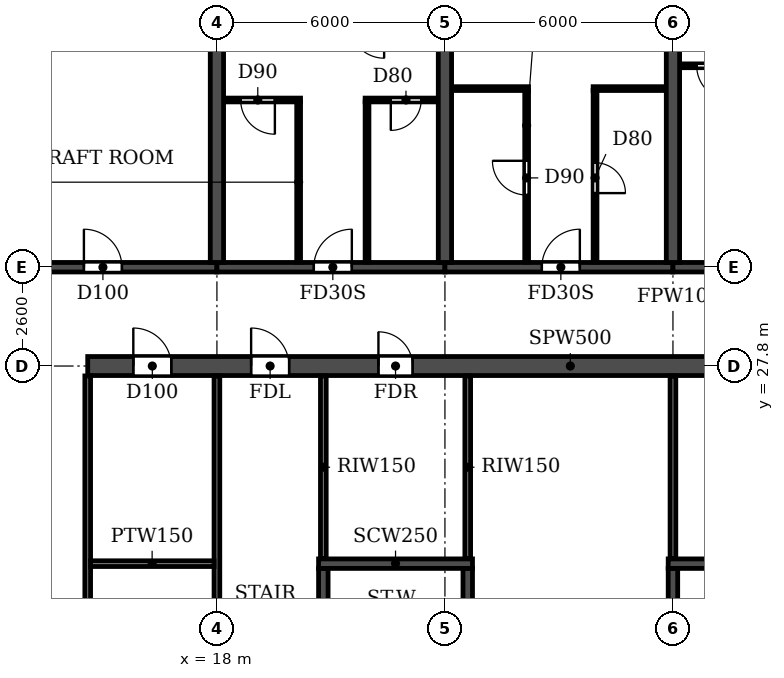
"""IFC4 building model, lengths in metres.
Left out: names, types, materials, properties, quantities, classifications, styles, units other than length and angle.
Written with IfcOpenShell. Run it as: python <this file> out.ifc"""

import sys

from ifc_helpers import new_model, si_unit, direction, frame, frame_2d, origin, place, context, subcontext, project, spatial, rectangle, extrude, element, fill, save


model = new_model("IFC4")
c1 = context("Model", 3, precision=1e-05, world=origin(), true_north=direction((0.0, 1.0)))
c2 = subcontext(c1, "Body", "Model", "MODEL_VIEW")
j1 = project(units=[si_unit("LENGTHUNIT", "METRE"), si_unit("PLANEANGLEUNIT", "RADIAN")], contexts=[c1])
p1 = place(None, origin())
s1 = spatial("IfcSite", under=j1, at=p1, CompositionType="ELEMENT")
p2 = place(p1, origin())
s2 = spatial("IfcBuilding", under=s1, at=p2, CompositionType="ELEMENT")
p3 = place(p2, frame((0.0, 0.0, 109.2)))
s3 = spatial("IfcBuildingStorey", under=s2, at=p3, CompositionType="ELEMENT", Elevation=109.2)
for number, where, z_axis, x_axis in (
    (1, (18.0, 30.525, 0.0), (0.0, 0.0, 1.0), (0.0, 1.0, 0.0)),
    (2, (24.0, 30.525, 0.0), (0.0, 0.0, 1.0), (0.0, 1.0, 0.0)),
    (3, (30.0, 30.525, 0.0), (0.0, 0.0, 1.0), (0.0, 1.0, 0.0)),
):
    element("IfcWall", number, at=place(p3, frame(where, z_axis=z_axis, x_axis=x_axis)), inside=s3, PredefinedType="SHEAR", context=c2, shape_type="SweptSolid", body=[
        extrude(rectangle(XDim=12.875, YDim=0.35, at=frame_2d((6.438, 0.0))), origin(), (0.0, 0.0, 1.0), 3.06),
    ])
p4 = place(p3, frame((12.2, 30.4, 0.0), z_axis=(0.0, 0.0, 1.0), x_axis=(1.0, 0.0, 0.0)))
e4 = element("IfcWall", 4, at=p4, inside=s3, PredefinedType="SHEAR", context=c2, shape_type="SweptSolid", body=[
    extrude(rectangle(XDim=5.8, YDim=0.25, at=frame_2d((2.9, 0.0))), origin(), (0.0, 0.0, 1.0), 2.46),
])
p5 = place(p4, frame((2.3, 0.0, 0.0)))
e5 = element("IfcOpeningElement", 5, at=p5, cuts=e4, PredefinedType="OPENING", context=c2, shape_type="SweptSolid", body=[
    extrude(rectangle(XDim=1.0, YDim=2.1, at=frame_2d((0.5, 1.05))), frame((0.0, 0.135, 0.0), z_axis=(0.0, -1.0, 0.0), x_axis=(1.0, 0.0, 0.0)), (0.0, 0.0, 1.0), 0.27),
])
p6 = place(p3, frame((18.0, 30.4, 0.0), z_axis=(0.0, 0.0, 1.0), x_axis=(1.0, 0.0, 0.0)))
e6 = element("IfcWall", 6, at=p6, inside=s3, PredefinedType="SHEAR", context=c2, shape_type="SweptSolid", body=[
    extrude(rectangle(XDim=6.0, YDim=0.25, at=frame_2d((3.0, 0.0))), origin(), (0.0, 0.0, 1.0), 2.46),
])
p7 = place(p6, frame((2.55, 0.0, 0.0)))
e7 = element("IfcOpeningElement", 7, at=p7, cuts=e6, PredefinedType="OPENING", context=c2, shape_type="SweptSolid", body=[
    extrude(rectangle(XDim=1.0, YDim=2.1, at=frame_2d((0.5, 1.05))), frame((0.0, 0.135, 0.0), z_axis=(0.0, -1.0, 0.0), x_axis=(1.0, 0.0, 0.0)), (0.0, 0.0, 1.0), 0.27),
])
p8 = place(p3, frame((24.0, 30.4, 0.0), z_axis=(0.0, 0.0, 1.0), x_axis=(1.0, 0.0, 0.0)))
e8 = element("IfcWall", 8, at=p8, inside=s3, PredefinedType="SHEAR", context=c2, shape_type="SweptSolid", body=[
    extrude(rectangle(XDim=6.0, YDim=0.25, at=frame_2d((3.0, 0.0))), origin(), (0.0, 0.0, 1.0), 2.46),
])
p9 = place(p8, frame((2.55, 0.0, 0.0)))
e9 = element("IfcOpeningElement", 9, at=p9, cuts=e8, PredefinedType="OPENING", context=c2, shape_type="SweptSolid", body=[
    extrude(rectangle(XDim=1.0, YDim=2.1, at=frame_2d((0.5, 1.05))), frame((0.0, 0.135, 0.0), z_axis=(0.0, -1.0, 0.0), x_axis=(1.0, 0.0, 0.0)), (0.0, 0.0, 1.0), 0.27),
])
p10 = place(p3, frame((30.0, 30.4, 0.0), z_axis=(0.0, 0.0, 1.0), x_axis=(1.0, 0.0, 0.0)))
e10 = element("IfcWall", 10, at=p10, inside=s3, PredefinedType="SHEAR", context=c2, shape_type="SweptSolid", body=[
    extrude(rectangle(XDim=6.0, YDim=0.25, at=frame_2d((3.0, 0.0))), origin(), (0.0, 0.0, 1.0), 2.46),
])
p11 = place(p10, frame((2.55, 0.0, 0.0)))
e11 = element("IfcOpeningElement", 11, at=p11, cuts=e10, PredefinedType="OPENING", context=c2, shape_type="SweptSolid", body=[
    extrude(rectangle(XDim=1.0, YDim=2.1, at=frame_2d((0.5, 1.05))), frame((0.0, 0.135, 0.0), z_axis=(0.0, -1.0, 0.0), x_axis=(1.0, 0.0, 0.0)), (0.0, 0.0, 1.0), 0.27),
])
p12 = place(p3, frame((14.6, 27.8, 0.0), z_axis=(0.0, 0.0, 1.0), x_axis=(1.0, 0.0, 0.0)))
e12 = element("IfcWall", 12, at=p12, inside=s3, PredefinedType="SOLIDWALL", context=c2, shape_type="SweptSolid", body=[
    extrude(rectangle(XDim=72.8, YDim=0.5, at=frame_2d((36.4, 0.0))), origin(), (0.0, 0.0, 1.0), 3.06),
])
p13 = place(p12, frame((1.2, 0.0, 0.0)))
e13 = element("IfcOpeningElement", 13, at=p13, cuts=e12, PredefinedType="OPENING", context=c2, shape_type="SweptSolid", body=[
    extrude(rectangle(XDim=1.0, YDim=2.1, at=frame_2d((0.5, 1.05))), frame((0.0, 0.26, 0.0), z_axis=(0.0, -1.0, 0.0), x_axis=(1.0, 0.0, 0.0)), (0.0, 0.0, 1.0), 0.52),
])
p14 = place(p12, frame((4.3, 0.0, 0.0)))
e14 = element("IfcOpeningElement", 14, at=p14, cuts=e12, PredefinedType="OPENING", context=c2, shape_type="SweptSolid", body=[
    extrude(rectangle(XDim=1.0, YDim=2.1, at=frame_2d((0.5, 1.05))), frame((0.0, 0.26, 0.0), z_axis=(0.0, -1.0, 0.0), x_axis=(1.0, 0.0, 0.0)), (0.0, 0.0, 1.0), 0.52),
])
p15 = place(p12, frame((7.65, 0.0, 0.0)))
e15 = element("IfcOpeningElement", 15, at=p15, cuts=e12, PredefinedType="OPENING", context=c2, shape_type="SweptSolid", body=[
    extrude(rectangle(XDim=0.9, YDim=2.1, at=frame_2d((0.45, 1.05))), frame((0.0, 0.26, 0.0), z_axis=(0.0, -1.0, 0.0), x_axis=(1.0, 0.0, 0.0)), (0.0, 0.0, 1.0), 0.52),
])
p16 = place(p12, frame((16.85, 0.0, 0.0)))
e16 = element("IfcOpeningElement", 16, at=p16, cuts=e12, PredefinedType="OPENING", context=c2, shape_type="SweptSolid", body=[
    extrude(rectangle(XDim=0.9, YDim=2.1, at=frame_2d((0.45, 1.05))), frame((0.0, 0.26, 0.0), z_axis=(0.0, -1.0, 0.0), x_axis=(1.0, 0.0, 0.0)), (0.0, 0.0, 1.0), 0.52),
])
p17 = place(p12, frame((20.0, 0.0, 0.0)))
e17 = element("IfcOpeningElement", 17, at=p17, cuts=e12, PredefinedType="OPENING", context=c2, shape_type="SweptSolid", body=[
    extrude(rectangle(XDim=1.0, YDim=2.1, at=frame_2d((0.5, 1.05))), frame((0.0, 0.26, 0.0), z_axis=(0.0, -1.0, 0.0), x_axis=(1.0, 0.0, 0.0)), (0.0, 0.0, 1.0), 0.52),
])
p18 = place(p12, frame((25.2, 0.0, 0.0)))
e18 = element("IfcOpeningElement", 18, at=p18, cuts=e12, PredefinedType="OPENING", context=c2, shape_type="SweptSolid", body=[
    extrude(rectangle(XDim=1.0, YDim=2.1, at=frame_2d((0.5, 1.05))), frame((0.0, 0.26, 0.0), z_axis=(0.0, -1.0, 0.0), x_axis=(1.0, 0.0, 0.0)), (0.0, 0.0, 1.0), 0.52),
])
p19 = place(p12, frame((33.0, 0.0, 0.0)))
e19 = element("IfcOpeningElement", 19, at=p19, cuts=e12, PredefinedType="OPENING", context=c2, shape_type="SweptSolid", body=[
    extrude(rectangle(XDim=1.0, YDim=2.1, at=frame_2d((0.5, 1.05))), frame((0.0, 0.26, 0.0), z_axis=(0.0, -1.0, 0.0), x_axis=(1.0, 0.0, 0.0)), (0.0, 0.0, 1.0), 0.52),
])
p20 = place(p12, frame((35.9, 0.0, 0.0)))
e20 = element("IfcOpeningElement", 20, at=p20, cuts=e12, PredefinedType="OPENING", context=c2, shape_type="SweptSolid", body=[
    extrude(rectangle(XDim=1.0, YDim=2.1, at=frame_2d((0.5, 1.05))), frame((0.0, 0.26, 0.0), z_axis=(0.0, -1.0, 0.0), x_axis=(1.0, 0.0, 0.0)), (0.0, 0.0, 1.0), 0.52),
])
p21 = place(p12, frame((38.8, 0.0, 0.0)))
e21 = element("IfcOpeningElement", 21, at=p21, cuts=e12, PredefinedType="OPENING", context=c2, shape_type="SweptSolid", body=[
    extrude(rectangle(XDim=1.0, YDim=2.1, at=frame_2d((0.5, 1.05))), frame((0.0, 0.26, 0.0), z_axis=(0.0, -1.0, 0.0), x_axis=(1.0, 0.0, 0.0)), (0.0, 0.0, 1.0), 0.52),
])
p22 = place(p12, frame((42.7, 0.0, 0.0)))
e22 = element("IfcOpeningElement", 22, at=p22, cuts=e12, PredefinedType="OPENING", context=c2, shape_type="SweptSolid", body=[
    extrude(rectangle(XDim=1.0, YDim=2.1, at=frame_2d((0.5, 1.05))), frame((0.0, 0.26, 0.0), z_axis=(0.0, -1.0, 0.0), x_axis=(1.0, 0.0, 0.0)), (0.0, 0.0, 1.0), 0.52),
])
p23 = place(p12, frame((47.65, 0.0, 0.0)))
e23 = element("IfcOpeningElement", 23, at=p23, cuts=e12, PredefinedType="OPENING", context=c2, shape_type="SweptSolid", body=[
    extrude(rectangle(XDim=1.5, YDim=2.1, at=frame_2d((0.75, 1.05))), frame((0.0, 0.26, 0.0), z_axis=(0.0, -1.0, 0.0), x_axis=(1.0, 0.0, 0.0)), (0.0, 0.0, 1.0), 0.52),
])
p24 = place(p12, frame((51.8, 0.0, 0.0)))
e24 = element("IfcOpeningElement", 24, at=p24, cuts=e12, PredefinedType="OPENING", context=c2, shape_type="SweptSolid", body=[
    extrude(rectangle(XDim=1.0, YDim=2.1, at=frame_2d((0.5, 1.05))), frame((0.0, 0.26, 0.0), z_axis=(0.0, -1.0, 0.0), x_axis=(1.0, 0.0, 0.0)), (0.0, 0.0, 1.0), 0.52),
])
p25 = place(p12, frame((55.05, 0.0, 0.0)))
e25 = element("IfcOpeningElement", 25, at=p25, cuts=e12, PredefinedType="OPENING", context=c2, shape_type="SweptSolid", body=[
    extrude(rectangle(XDim=0.9, YDim=2.1, at=frame_2d((0.45, 1.05))), frame((0.0, 0.26, 0.0), z_axis=(0.0, -1.0, 0.0), x_axis=(1.0, 0.0, 0.0)), (0.0, 0.0, 1.0), 0.52),
])
p26 = place(p12, frame((64.25, 0.0, 0.0)))
e26 = element("IfcOpeningElement", 26, at=p26, cuts=e12, PredefinedType="OPENING", context=c2, shape_type="SweptSolid", body=[
    extrude(rectangle(XDim=0.9, YDim=2.1, at=frame_2d((0.45, 1.05))), frame((0.0, 0.26, 0.0), z_axis=(0.0, -1.0, 0.0), x_axis=(1.0, 0.0, 0.0)), (0.0, 0.0, 1.0), 0.52),
])
p27 = place(p12, frame((67.5, 0.0, 0.0)))
e27 = element("IfcOpeningElement", 27, at=p27, cuts=e12, PredefinedType="OPENING", context=c2, shape_type="SweptSolid", body=[
    extrude(rectangle(XDim=1.0, YDim=2.1, at=frame_2d((0.5, 1.05))), frame((0.0, 0.26, 0.0), z_axis=(0.0, -1.0, 0.0), x_axis=(1.0, 0.0, 0.0)), (0.0, 0.0, 1.0), 0.52),
])
p28 = place(p12, frame((70.6, 0.0, 0.0)))
e28 = element("IfcOpeningElement", 28, at=p28, cuts=e12, PredefinedType="OPENING", context=c2, shape_type="SweptSolid", body=[
    extrude(rectangle(XDim=1.0, YDim=2.1, at=frame_2d((0.5, 1.05))), frame((0.0, 0.26, 0.0), z_axis=(0.0, -1.0, 0.0), x_axis=(1.0, 0.0, 0.0)), (0.0, 0.0, 1.0), 0.52),
])
p29 = place(p3, frame((30.0, 14.85, 0.0), z_axis=(0.0, 0.0, 1.0), x_axis=(0.0, 1.0, 0.0)))
e29 = element("IfcWall", 29, at=p29, inside=s3, PredefinedType="SOLIDWALL", context=c2, shape_type="SweptSolid", body=[
    extrude(rectangle(XDim=7.625, YDim=0.25, at=frame_2d((3.812, 0.0))), origin(), (0.0, 0.0, 1.0), 3.06),
])
p30 = place(p3, frame((29.875, 22.6, 0.0), z_axis=(0.0, 0.0, 1.0), x_axis=(1.0, 0.0, 0.0)))
e30 = element("IfcWall", 30, at=p30, inside=s3, PredefinedType="SOLIDWALL", context=c2, shape_type="SweptSolid", body=[
    extrude(rectangle(XDim=4.05, YDim=0.25, at=frame_2d((2.025, 0.0))), origin(), (0.0, 0.0, 1.0), 3.06),
])
p31 = place(p3, frame((20.8, 14.85, 0.0), z_axis=(0.0, 0.0, 1.0), x_axis=(0.0, 1.0, 0.0)))
e31 = element("IfcWall", 31, at=p31, inside=s3, PredefinedType="SOLIDWALL", context=c2, shape_type="SweptSolid", body=[
    extrude(rectangle(XDim=7.625, YDim=0.25, at=frame_2d((3.812, 0.0))), origin(), (0.0, 0.0, 1.0), 3.06),
])
p32 = place(p31, frame((0.45, 0.0, 0.0)))
e32 = element("IfcOpeningElement", 32, at=p32, cuts=e31, PredefinedType="OPENING", context=c2, shape_type="SweptSolid", body=[
    extrude(rectangle(XDim=1.0, YDim=2.1, at=frame_2d((0.5, 1.05))), frame((0.0, 0.135, 0.0), z_axis=(0.0, -1.0, 0.0), x_axis=(1.0, 0.0, 0.0)), (0.0, 0.0, 1.0), 0.27),
])
p33 = place(p3, frame((24.6, 14.85, 0.0), z_axis=(0.0, 0.0, 1.0), x_axis=(0.0, 1.0, 0.0)))
e33 = element("IfcWall", 33, at=p33, inside=s3, PredefinedType="SOLIDWALL", context=c2, shape_type="SweptSolid", body=[
    extrude(rectangle(XDim=7.625, YDim=0.25, at=frame_2d((3.812, 0.0))), origin(), (0.0, 0.0, 1.0), 3.06),
])
p34 = place(p3, frame((20.675, 22.6, 0.0), z_axis=(0.0, 0.0, 1.0), x_axis=(1.0, 0.0, 0.0)))
e34 = element("IfcWall", 34, at=p34, inside=s3, PredefinedType="SOLIDWALL", context=c2, shape_type="SweptSolid", body=[
    extrude(rectangle(XDim=4.05, YDim=0.25, at=frame_2d((2.025, 0.0))), origin(), (0.0, 0.0, 1.0), 3.06),
])
for number, where, z_axis, x_axis in (
    (35, (14.6, 14.86, 0.0), (0.0, 0.0, 1.0), (0.0, 1.0, 0.0)),
    (36, (18.0, 14.86, 0.0), (0.0, 0.0, 1.0), (0.0, 1.0, 0.0)),
):
    element("IfcWall", number, at=place(p3, frame(where, z_axis=z_axis, x_axis=x_axis)), inside=s3, PredefinedType="PARTITIONING", context=c2, shape_type="SweptSolid", body=[
        extrude(rectangle(XDim=12.68, YDim=0.15, at=frame_2d((6.34, 0.0))), origin(), (0.0, 0.0, 1.0), 3.06),
    ])
p35 = place(p3, frame((18.185, 34.8, 0.0), z_axis=(0.0, 0.0, 1.0), x_axis=(1.0, 0.0, 0.0)))
e37 = element("IfcWall", 37, at=p35, inside=s3, PredefinedType="PARTITIONING", context=c2, shape_type="SweptSolid", body=[
    extrude(rectangle(XDim=2.015, YDim=0.1, at=frame_2d((1.007, 0.0))), origin(), (0.0, 0.0, 1.0), 3.06),
])
p36 = place(p35, frame((0.44, 0.0, 0.0)))
e38 = element("IfcOpeningElement", 38, at=p36, cuts=e37, PredefinedType="OPENING", context=c2, shape_type="SweptSolid", body=[
    extrude(rectangle(XDim=0.9, YDim=2.1, at=frame_2d((0.45, 1.05))), frame((0.0, 0.06, 0.0), z_axis=(0.0, -1.0, 0.0), x_axis=(1.0, 0.0, 0.0)), (0.0, 0.0, 1.0), 0.12),
])
p37 = place(p3, frame((21.9, 34.8, 0.0), z_axis=(0.0, 0.0, 1.0), x_axis=(1.0, 0.0, 0.0)))
e39 = element("IfcWall", 39, at=p37, inside=s3, PredefinedType="PARTITIONING", context=c2, shape_type="SweptSolid", body=[
    extrude(rectangle(XDim=1.915, YDim=0.1, at=frame_2d((0.958, 0.0))), origin(), (0.0, 0.0, 1.0), 3.06),
])
p38 = place(p37, frame((0.675, 0.0, 0.0)))
e40 = element("IfcOpeningElement", 40, at=p38, cuts=e39, PredefinedType="OPENING", context=c2, shape_type="SweptSolid", body=[
    extrude(rectangle(XDim=0.8, YDim=2.1, at=frame_2d((0.4, 1.05))), frame((0.0, 0.06, 0.0), z_axis=(0.0, -1.0, 0.0), x_axis=(1.0, 0.0, 0.0)), (0.0, 0.0, 1.0), 0.12),
])
p39 = place(p3, frame((24.185, 35.1, 0.0), z_axis=(0.0, 0.0, 1.0), x_axis=(1.0, 0.0, 0.0)))
e41 = element("IfcWall", 41, at=p39, inside=s3, PredefinedType="PARTITIONING", context=c2, shape_type="SweptSolid", body=[
    extrude(rectangle(XDim=2.015, YDim=0.1, at=frame_2d((1.007, 0.0))), origin(), (0.0, 0.0, 1.0), 3.06),
])
p40 = place(p3, frame((27.9, 35.1, 0.0), z_axis=(0.0, 0.0, 1.0), x_axis=(1.0, 0.0, 0.0)))
e42 = element("IfcWall", 42, at=p40, inside=s3, PredefinedType="PARTITIONING", context=c2, shape_type="SweptSolid", body=[
    extrude(rectangle(XDim=1.915, YDim=0.1, at=frame_2d((0.958, 0.0))), origin(), (0.0, 0.0, 1.0), 3.06),
])
p41 = place(p3, frame((30.185, 35.7, 0.0), z_axis=(0.0, 0.0, 1.0), x_axis=(1.0, 0.0, 0.0)))
e43 = element("IfcWall", 43, at=p41, inside=s3, PredefinedType="PARTITIONING", context=c2, shape_type="SweptSolid", body=[
    extrude(rectangle(XDim=2.015, YDim=0.1, at=frame_2d((1.007, 0.0))), origin(), (0.0, 0.0, 1.0), 3.06),
])
p42 = place(p41, frame((0.44, 0.0, 0.0)))
e44 = element("IfcOpeningElement", 44, at=p42, cuts=e43, PredefinedType="OPENING", context=c2, shape_type="SweptSolid", body=[
    extrude(rectangle(XDim=0.9, YDim=2.1, at=frame_2d((0.45, 1.05))), frame((0.0, 0.06, 0.0), z_axis=(0.0, -1.0, 0.0), x_axis=(1.0, 0.0, 0.0)), (0.0, 0.0, 1.0), 0.12),
])
for number, where, z_axis, x_axis in (
    (45, (20.15, 30.535, 0.0), (0.0, 0.0, 1.0), (0.0, 1.0, 0.0)),
    (46, (21.95, 30.535, 0.0), (0.0, 0.0, 1.0), (0.0, 1.0, 0.0)),
):
    element("IfcWall", number, at=place(p3, frame(where, z_axis=z_axis, x_axis=x_axis)), inside=s3, PredefinedType="PARTITIONING", context=c2, shape_type="SweptSolid", body=[
        extrude(rectangle(XDim=4.215, YDim=0.1, at=frame_2d((2.107, 0.0))), origin(), (0.0, 0.0, 1.0), 3.06),
    ])
p43 = place(p3, frame((26.15, 30.535, 0.0), z_axis=(0.0, 0.0, 1.0), x_axis=(0.0, 1.0, 0.0)))
e47 = element("IfcWall", 47, at=p43, inside=s3, PredefinedType="PARTITIONING", context=c2, shape_type="SweptSolid", body=[
    extrude(rectangle(XDim=4.515, YDim=0.1, at=frame_2d((2.258, 0.0))), origin(), (0.0, 0.0, 1.0), 3.06),
])
p44 = place(p43, frame((1.765, 0.0, 0.0)))
e48 = element("IfcOpeningElement", 48, at=p44, cuts=e47, PredefinedType="OPENING", context=c2, shape_type="SweptSolid", body=[
    extrude(rectangle(XDim=0.9, YDim=2.1, at=frame_2d((0.45, 1.05))), frame((0.0, 0.06, 0.0), z_axis=(0.0, -1.0, 0.0), x_axis=(1.0, 0.0, 0.0)), (0.0, 0.0, 1.0), 0.12),
])
p45 = place(p3, frame((27.95, 30.535, 0.0), z_axis=(0.0, 0.0, 1.0), x_axis=(0.0, 1.0, 0.0)))
e49 = element("IfcWall", 49, at=p45, inside=s3, PredefinedType="PARTITIONING", context=c2, shape_type="SweptSolid", body=[
    extrude(rectangle(XDim=4.515, YDim=0.1, at=frame_2d((2.258, 0.0))), origin(), (0.0, 0.0, 1.0), 3.06),
])
p46 = place(p45, frame((1.815, 0.0, 0.0)))
e50 = element("IfcOpeningElement", 50, at=p46, cuts=e49, PredefinedType="OPENING", context=c2, shape_type="SweptSolid", body=[
    extrude(rectangle(XDim=0.8, YDim=2.1, at=frame_2d((0.4, 1.05))), frame((0.0, 0.06, 0.0), z_axis=(0.0, -1.0, 0.0), x_axis=(1.0, 0.0, 0.0)), (0.0, 0.0, 1.0), 0.12),
])
p47 = place(p3, frame((14.675, 22.6, 0.0), z_axis=(0.0, 0.0, 1.0), x_axis=(1.0, 0.0, 0.0)))
e51 = element("IfcWall", 51, at=p47, inside=s3, PredefinedType="PARTITIONING", context=c2, shape_type="SweptSolid", body=[
    extrude(rectangle(XDim=3.25, YDim=0.15, at=frame_2d((1.625, 0.0))), origin(), (0.0, 0.0, 1.0), 3.06),
])
for number, where, z_axis, x_axis in (
    (52, (20.8, 22.735, 0.0), (0.0, 0.0, 1.0), (0.0, 1.0, 0.0)),
    (53, (24.6, 22.735, 0.0), (0.0, 0.0, 1.0), (0.0, 1.0, 0.0)),
    (54, (30.0, 22.735, 0.0), (0.0, 0.0, 1.0), (0.0, 1.0, 0.0)),
):
    element("IfcWall", number, at=place(p3, frame(where, z_axis=z_axis, x_axis=x_axis)), inside=s3, PredefinedType="PARTITIONING", context=c2, shape_type="SweptSolid", body=[
        extrude(rectangle(XDim=4.805, YDim=0.15, at=frame_2d((2.402, 0.0))), origin(), (0.0, 0.0, 1.0), 3.06),
    ])
p48 = place(p13, origin())
e55 = element("IfcDoor", 55, at=p48, inside=s3, OperationType="SINGLE_SWING_LEFT", PredefinedType="DOOR", context=c2, shape_type="SweptSolid", body=[
    extrude(rectangle(XDim=1.0, YDim=2.1, at=frame_2d((0.5, 1.05))), frame((0.0, 0.025, 0.0), z_axis=(0.0, -1.0, 0.0), x_axis=(1.0, 0.0, 0.0)), (0.0, 0.0, 1.0), 0.05),
])
fill(e13, e55)
p49 = place(p14, origin())
e56 = element("IfcDoor", 56, at=p49, inside=s3, OperationType="SINGLE_SWING_LEFT", PredefinedType="DOOR", context=c2, shape_type="SweptSolid", body=[
    extrude(rectangle(XDim=1.0, YDim=2.1, at=frame_2d((0.5, 1.05))), frame((0.0, 0.025, 0.0), z_axis=(0.0, -1.0, 0.0), x_axis=(1.0, 0.0, 0.0)), (0.0, 0.0, 1.0), 0.05),
])
fill(e14, e56)
p50 = place(p15, origin())
e57 = element("IfcDoor", 57, at=p50, inside=s3, OperationType="SINGLE_SWING_LEFT", PredefinedType="DOOR", context=c2, shape_type="SweptSolid", body=[
    extrude(rectangle(XDim=0.9, YDim=2.1, at=frame_2d((0.45, 1.05))), frame((0.0, 0.025, 0.0), z_axis=(0.0, -1.0, 0.0), x_axis=(1.0, 0.0, 0.0)), (0.0, 0.0, 1.0), 0.05),
])
fill(e15, e57)
p51 = place(p5, origin())
e58 = element("IfcDoor", 58, at=p51, inside=s3, OperationType="SINGLE_SWING_LEFT", PredefinedType="DOOR", context=c2, shape_type="SweptSolid", body=[
    extrude(rectangle(XDim=1.0, YDim=2.1, at=frame_2d((0.5, 1.05))), frame((0.0, 0.025, 0.0), z_axis=(0.0, -1.0, 0.0), x_axis=(1.0, 0.0, 0.0)), (0.0, 0.0, 1.0), 0.05),
])
fill(e5, e58)
p52 = place(p36, frame((0.9, 0.0, 0.0), z_axis=(0.0, 0.0, 1.0), x_axis=(-1.0, 0.0, 0.0)))
e59 = element("IfcDoor", 59, at=p52, inside=s3, OperationType="SINGLE_SWING_LEFT", PredefinedType="DOOR", context=c2, shape_type="SweptSolid", body=[
    extrude(rectangle(XDim=0.9, YDim=2.1, at=frame_2d((0.45, 1.05))), frame((0.0, 0.025, 0.0), z_axis=(0.0, -1.0, 0.0), x_axis=(1.0, 0.0, 0.0)), (0.0, 0.0, 1.0), 0.05),
])
fill(e38, e59)
p53 = place(p7, origin())
e60 = element("IfcDoor", 60, at=p53, inside=s3, OperationType="SINGLE_SWING_RIGHT", PredefinedType="DOOR", context=c2, shape_type="SweptSolid", body=[
    extrude(rectangle(XDim=1.0, YDim=2.1, at=frame_2d((0.5, 1.05))), frame((0.0, 0.025, 0.0), z_axis=(0.0, -1.0, 0.0), x_axis=(1.0, 0.0, 0.0)), (0.0, 0.0, 1.0), 0.05),
])
fill(e7, e60)
p54 = place(p38, frame((0.8, 0.0, 0.0), z_axis=(0.0, 0.0, 1.0), x_axis=(-1.0, 0.0, 0.0)))
e61 = element("IfcDoor", 61, at=p54, inside=s3, OperationType="SINGLE_SWING_RIGHT", PredefinedType="DOOR", context=c2, shape_type="SweptSolid", body=[
    extrude(rectangle(XDim=0.8, YDim=2.1, at=frame_2d((0.4, 1.05))), frame((0.0, 0.025, 0.0), z_axis=(0.0, -1.0, 0.0), x_axis=(1.0, 0.0, 0.0)), (0.0, 0.0, 1.0), 0.05),
])
fill(e40, e61)
p55 = place(p44, origin())
e62 = element("IfcDoor", 62, at=p55, inside=s3, OperationType="SINGLE_SWING_RIGHT", PredefinedType="DOOR", context=c2, shape_type="SweptSolid", body=[
    extrude(rectangle(XDim=0.9, YDim=2.1, at=frame_2d((0.45, 1.05))), frame((0.0, 0.025, 0.0), z_axis=(0.0, -1.0, 0.0), x_axis=(1.0, 0.0, 0.0)), (0.0, 0.0, 1.0), 0.05),
])
fill(e48, e62)
p56 = place(p9, origin())
e63 = element("IfcDoor", 63, at=p56, inside=s3, OperationType="SINGLE_SWING_RIGHT", PredefinedType="DOOR", context=c2, shape_type="SweptSolid", body=[
    extrude(rectangle(XDim=1.0, YDim=2.1, at=frame_2d((0.5, 1.05))), frame((0.0, 0.025, 0.0), z_axis=(0.0, -1.0, 0.0), x_axis=(1.0, 0.0, 0.0)), (0.0, 0.0, 1.0), 0.05),
])
fill(e9, e63)
p57 = place(p46, frame((0.8, 0.0, 0.0), z_axis=(0.0, 0.0, 1.0), x_axis=(-1.0, 0.0, 0.0)))
e64 = element("IfcDoor", 64, at=p57, inside=s3, OperationType="SINGLE_SWING_RIGHT", PredefinedType="DOOR", context=c2, shape_type="SweptSolid", body=[
    extrude(rectangle(XDim=0.8, YDim=2.1, at=frame_2d((0.4, 1.05))), frame((0.0, 0.025, 0.0), z_axis=(0.0, -1.0, 0.0), x_axis=(1.0, 0.0, 0.0)), (0.0, 0.0, 1.0), 0.05),
])
fill(e50, e64)
p58 = place(p42, frame((0.9, 0.0, 0.0), z_axis=(0.0, 0.0, 1.0), x_axis=(-1.0, 0.0, 0.0)))
e65 = element("IfcDoor", 65, at=p58, inside=s3, OperationType="SINGLE_SWING_LEFT", PredefinedType="DOOR", context=c2, shape_type="SweptSolid", body=[
    extrude(rectangle(XDim=0.9, YDim=2.1, at=frame_2d((0.45, 1.05))), frame((0.0, 0.025, 0.0), z_axis=(0.0, -1.0, 0.0), x_axis=(1.0, 0.0, 0.0)), (0.0, 0.0, 1.0), 0.05),
])
fill(e44, e65)
save(model, sys.argv[1])
